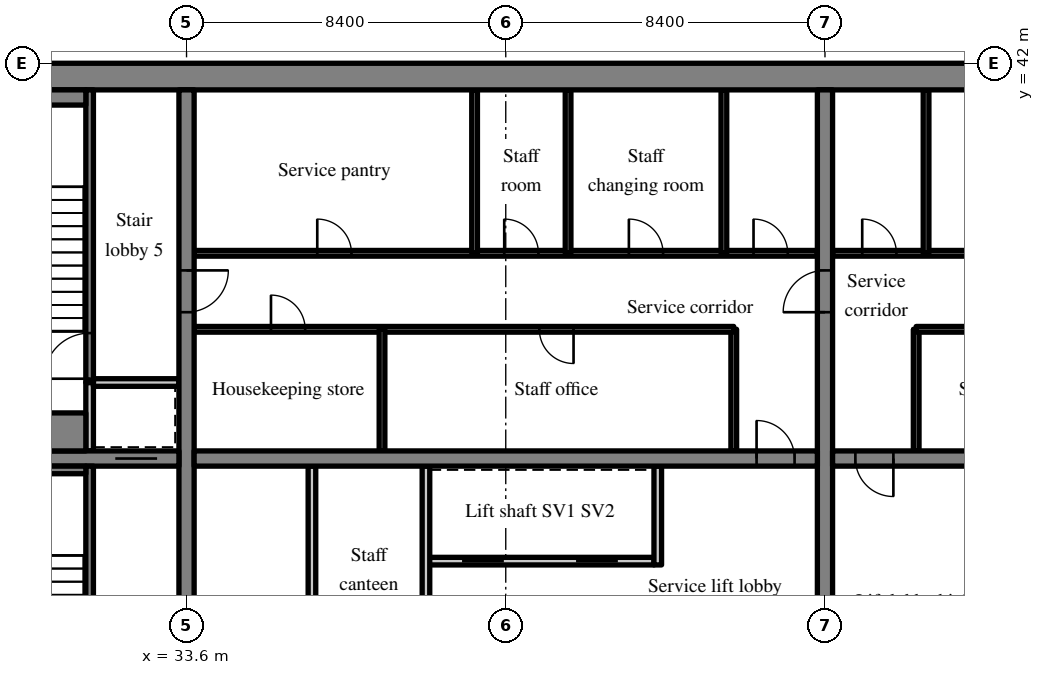
"""IFC4 building model, lengths in metres.
Left out: names, types, materials, properties, quantities, classifications, styles, units other than length and angle.
Written with IfcOpenShell. Run it as: python <this file> out.ifc"""

import sys

from ifc_helpers import new_model, si_unit, direction, frame, frame_2d, origin, place, context, subcontext, project, spatial, rectangle, extrude, source, transform, mapped, element, fill, save


model = new_model("IFC4")
c1 = context("Model", 3, precision=1e-05, world=origin(), true_north=direction((0.0, 1.0)))
c2 = subcontext(c1, "Body", "Model", "MODEL_VIEW")
j1 = project(units=[si_unit("LENGTHUNIT", "METRE"), si_unit("PLANEANGLEUNIT", "RADIAN")], contexts=[c1])
p1 = place(None, origin())
s1 = spatial("IfcSite", under=j1, at=p1, CompositionType="ELEMENT")
p2 = place(p1, origin())
s2 = spatial("IfcBuilding", under=s1, at=p2, CompositionType="ELEMENT")
p3 = place(p2, frame((0.0, 0.0, 163.0)))
s3 = spatial("IfcBuildingStorey", under=s2, at=p3, CompositionType="ELEMENT", Elevation=163.0)
m1 = source(origin(), c2, "Body", "SweptSolid", [
    extrude(rectangle(XDim=50.4, YDim=0.7, at=frame_2d((25.2, 0.0))), origin(), (0.0, 0.0, 1.0), 3.52),
])
p4 = place(p3, frame((25.2, 41.65, 0.0), z_axis=(0.0, 0.0, 1.0), x_axis=(1.0, 0.0, 0.0)))
e1 = element("IfcWall", 1, at=p4, inside=s3, PredefinedType="SHEAR", context=c2, shape_type="MappedRepresentation", body=[
    mapped(m1, transform((0.0, 0.0, 0.0), scale=1.0)),
])
m2 = source(origin(), c2, "Body", "SweptSolid", [
    extrude(rectangle(XDim=18.6, YDim=0.4, at=frame_2d((9.3, 0.0))), origin(), (0.0, 0.0, 1.0), 3.52),
])
p5 = place(p3, frame((33.6, 22.7, 0.0), z_axis=(0.0, 0.0, 1.0), x_axis=(0.0, 1.0, 0.0)))
e2 = element("IfcWall", 2, at=p5, inside=s3, PredefinedType="SHEAR", context=c2, shape_type="MappedRepresentation", body=[
    mapped(m2, transform((0.0, 0.0, 0.0), scale=1.0)),
])
m3 = source(origin(), c2, "Body", "SweptSolid", [
    extrude(rectangle(XDim=1.1, YDim=2.1, at=frame_2d((0.55, 1.05))), frame((0.0, 0.21, 0.0), z_axis=(0.0, -1.0, 0.0), x_axis=(1.0, 0.0, 0.0)), (0.0, 0.0, 1.0), 0.42),
])
p6 = place(p5, frame((12.75, 0.0, 0.0)))
e3 = element("IfcOpeningElement", 3, at=p6, cuts=e2, PredefinedType="OPENING", context=c2, shape_type="MappedRepresentation", body=[
    mapped(m3, transform((0.0, 0.0, 0.0), scale=1.0)),
])
p7 = place(p3, frame((50.4, 22.7, 0.0), z_axis=(0.0, 0.0, 1.0), x_axis=(0.0, 1.0, 0.0)))
e4 = element("IfcWall", 4, at=p7, inside=s3, PredefinedType="SHEAR", context=c2, shape_type="MappedRepresentation", body=[
    mapped(m2, transform((0.0, 0.0, 0.0), scale=1.0)),
])
p8 = place(p7, frame((12.75, 0.0, 0.0)))
e5 = element("IfcOpeningElement", 5, at=p8, cuts=e4, PredefinedType="OPENING", context=c2, shape_type="MappedRepresentation", body=[
    mapped(m3, transform((0.0, 0.0, 0.0), scale=1.0)),
])
m4 = source(origin(), c2, "Body", "SweptSolid", [
    extrude(rectangle(XDim=7.5, YDim=0.4, at=frame_2d((3.75, 0.0))), origin(), (0.0, 0.0, 1.0), 3.52),
])
p9 = place(p3, frame((25.9, 31.6, 0.0), z_axis=(0.0, 0.0, 1.0), x_axis=(1.0, 0.0, 0.0)))
e6 = element("IfcWall", 6, at=p9, inside=s3, PredefinedType="SHEAR", context=c2, shape_type="MappedRepresentation", body=[
    mapped(m4, transform((0.0, 0.0, 0.0), scale=1.0)),
])
p10 = place(p9, frame((5.825, 0.0, 0.0)))
e7 = element("IfcOpeningElement", 7, at=p10, cuts=e6, PredefinedType="OPENING", context=c2, shape_type="MappedRepresentation", body=[
    mapped(m3, transform((0.0, 0.0, 0.0), scale=1.0)),
])
m5 = source(origin(), c2, "Body", "SweptSolid", [
    extrude(rectangle(XDim=16.4, YDim=0.4, at=frame_2d((8.2, 0.0))), origin(), (0.0, 0.0, 1.0), 3.52),
])
p11 = place(p3, frame((33.8, 31.6, 0.0), z_axis=(0.0, 0.0, 1.0), x_axis=(1.0, 0.0, 0.0)))
e8 = element("IfcWall", 8, at=p11, inside=s3, PredefinedType="SHEAR", context=c2, shape_type="MappedRepresentation", body=[
    mapped(m5, transform((0.0, 0.0, 0.0), scale=1.0)),
])
m6 = source(origin(), c2, "Body", "SweptSolid", [
    extrude(rectangle(XDim=1.0, YDim=2.1, at=frame_2d((0.5, 1.05))), frame((0.0, 0.21, 0.0), z_axis=(0.0, -1.0, 0.0), x_axis=(1.0, 0.0, 0.0)), (0.0, 0.0, 1.0), 0.42),
])
p12 = place(p11, frame((14.8, 0.0, 0.0)))
e9 = element("IfcOpeningElement", 9, at=p12, cuts=e8, PredefinedType="OPENING", context=c2, shape_type="MappedRepresentation", body=[
    mapped(m6, transform((0.0, 0.0, 0.0), scale=1.0)),
])
p13 = place(p3, frame((50.6, 31.6, 0.0), z_axis=(0.0, 0.0, 1.0), x_axis=(1.0, 0.0, 0.0)))
e10 = element("IfcWall", 10, at=p13, inside=s3, PredefinedType="SHEAR", context=c2, shape_type="MappedRepresentation", body=[
    mapped(m5, transform((0.0, 0.0, 0.0), scale=1.0)),
])
p14 = place(p13, frame((0.6, 0.0, 0.0)))
e11 = element("IfcOpeningElement", 11, at=p14, cuts=e10, PredefinedType="OPENING", context=c2, shape_type="MappedRepresentation", body=[
    mapped(m6, transform((0.0, 0.0, 0.0), scale=1.0)),
])
m7 = source(origin(), c2, "Body", "SweptSolid", [
    extrude(rectangle(XDim=6.0, YDim=0.2, at=frame_2d((3.0, 0.0))), origin(), (0.0, 0.0, 1.0), 3.52),
])
p15 = place(p3, frame((39.9, 28.9, 0.0), z_axis=(0.0, 0.0, 1.0), x_axis=(1.0, 0.0, 0.0)))
e12 = element("IfcWall", 12, at=p15, inside=s3, PredefinedType="SOLIDWALL", context=c2, shape_type="MappedRepresentation", body=[
    mapped(m7, transform((0.0, 0.0, 0.0), scale=1.0)),
])
m8 = source(origin(), c2, "Body", "SweptSolid", [
    extrude(rectangle(XDim=1.1, YDim=2.1, at=frame_2d((0.55, 1.05))), frame((0.0, 0.11, 0.0), z_axis=(0.0, -1.0, 0.0), x_axis=(1.0, 0.0, 0.0)), (0.0, 0.0, 1.0), 0.22),
])
p16 = place(p15, frame((0.95, 0.0, 0.0)))
e13 = element("IfcOpeningElement", 13, at=p16, cuts=e12, PredefinedType="OPENING", context=c2, shape_type="MappedRepresentation", body=[
    mapped(m8, transform((0.0, 0.0, 0.0), scale=1.0)),
])
p17 = place(p15, frame((3.95, 0.0, 0.0)))
e14 = element("IfcOpeningElement", 14, at=p17, cuts=e12, PredefinedType="OPENING", context=c2, shape_type="MappedRepresentation", body=[
    mapped(m8, transform((0.0, 0.0, 0.0), scale=1.0)),
])
m9 = source(origin(), c2, "Body", "SweptSolid", [
    extrude(rectangle(XDim=8.7, YDim=0.2, at=frame_2d((4.35, 0.0))), origin(), (0.0, 0.0, 1.0), 3.52),
])
p18 = place(p3, frame((39.9, 22.7, 0.0), z_axis=(0.0, 0.0, 1.0), x_axis=(0.0, 1.0, 0.0)))
e15 = element("IfcWall", 15, at=p18, inside=s3, PredefinedType="PARTITIONING", context=c2, shape_type="MappedRepresentation", body=[
    mapped(m9, transform((0.0, 0.0, 0.0), scale=1.0)),
])
m10 = source(origin(), c2, "Body", "SweptSolid", [
    extrude(rectangle(XDim=0.9, YDim=2.1, at=frame_2d((0.45, 1.05))), frame((0.0, 0.11, 0.0), z_axis=(0.0, -1.0, 0.0), x_axis=(1.0, 0.0, 0.0)), (0.0, 0.0, 1.0), 0.22),
])
p19 = place(p18, frame((3.85, 0.0, 0.0)))
e16 = element("IfcOpeningElement", 16, at=p19, cuts=e15, PredefinedType="OPENING", context=c2, shape_type="MappedRepresentation", body=[
    mapped(m10, transform((0.0, 0.0, 0.0), scale=1.0)),
])
m11 = source(origin(), c2, "Body", "SweptSolid", [
    extrude(rectangle(XDim=2.6, YDim=0.2, at=frame_2d((1.3, 0.0))), origin(), (0.0, 0.0, 1.0), 3.52),
])
p20 = place(p3, frame((46.0, 28.8, 0.0), z_axis=(0.0, 0.0, 1.0), x_axis=(0.0, 1.0, 0.0)))
e17 = element("IfcWall", 17, at=p20, inside=s3, PredefinedType="SOLIDWALL", context=c2, shape_type="MappedRepresentation", body=[
    mapped(m11, transform((0.0, 0.0, 0.0), scale=1.0)),
])
p21 = place(p3, frame((36.9, 22.7, 0.0), z_axis=(0.0, 0.0, 1.0), x_axis=(0.0, 1.0, 0.0)))
e18 = element("IfcWall", 18, at=p21, inside=s3, PredefinedType="PARTITIONING", context=c2, shape_type="MappedRepresentation", body=[
    mapped(m9, transform((0.0, 0.0, 0.0), scale=1.0)),
])
m12 = source(origin(), c2, "Body", "SweptSolid", [
    extrude(rectangle(XDim=3.2, YDim=0.15, at=frame_2d((1.6, 0.0))), origin(), (0.0, 0.0, 1.0), 3.52),
])
p22 = place(p3, frame((48.0, 31.8, 0.0), z_axis=(0.0, 0.0, 1.0), x_axis=(0.0, 1.0, 0.0)))
e19 = element("IfcWall", 19, at=p22, inside=s3, PredefinedType="PARTITIONING", context=c2, shape_type="MappedRepresentation", body=[
    mapped(m12, transform((0.0, 0.0, 0.0), scale=1.0)),
])
m13 = source(origin(), c2, "Body", "SweptSolid", [
    extrude(rectangle(XDim=14.2, YDim=0.15, at=frame_2d((7.1, 0.0))), origin(), (0.0, 0.0, 1.0), 3.52),
])
p23 = place(p3, frame((33.8, 35.0, 0.0), z_axis=(0.0, 0.0, 1.0), x_axis=(1.0, 0.0, 0.0)))
e20 = element("IfcWall", 20, at=p23, inside=s3, PredefinedType="PARTITIONING", context=c2, shape_type="MappedRepresentation", body=[
    mapped(m13, transform((0.0, 0.0, 0.0), scale=1.0)),
])
m14 = source(origin(), c2, "Body", "SweptSolid", [
    extrude(rectangle(XDim=0.9, YDim=2.1, at=frame_2d((0.45, 1.05))), frame((0.0, 0.085, 0.0), z_axis=(0.0, -1.0, 0.0), x_axis=(1.0, 0.0, 0.0)), (0.0, 0.0, 1.0), 0.17),
])
p24 = place(p23, frame((2.022, 0.0, 0.0)))
e21 = element("IfcOpeningElement", 21, at=p24, cuts=e20, PredefinedType="OPENING", context=c2, shape_type="MappedRepresentation", body=[
    mapped(m14, transform((0.0, 0.0, 0.0), scale=1.0)),
])
p25 = place(p23, frame((9.084, 0.0, 0.0)))
e22 = element("IfcOpeningElement", 22, at=p25, cuts=e20, PredefinedType="OPENING", context=c2, shape_type="MappedRepresentation", body=[
    mapped(m14, transform((0.0, 0.0, 0.0), scale=1.0)),
])
m15 = source(origin(), c2, "Body", "SweptSolid", [
    extrude(rectangle(XDim=16.4, YDim=0.15, at=frame_2d((8.2, 0.0))), origin(), (0.0, 0.0, 1.0), 3.52),
])
p26 = place(p3, frame((33.8, 37.0, 0.0), z_axis=(0.0, 0.0, 1.0), x_axis=(1.0, 0.0, 0.0)))
e23 = element("IfcWall", 23, at=p26, inside=s3, PredefinedType="PARTITIONING", context=c2, shape_type="MappedRepresentation", body=[
    mapped(m15, transform((0.0, 0.0, 0.0), scale=1.0)),
])
p27 = place(p26, frame((3.24, 0.0, 0.0)))
e24 = element("IfcOpeningElement", 24, at=p27, cuts=e23, PredefinedType="OPENING", context=c2, shape_type="MappedRepresentation", body=[
    mapped(m14, transform((0.0, 0.0, 0.0), scale=1.0)),
])
p28 = place(p26, frame((8.16, 0.0, 0.0)))
e25 = element("IfcOpeningElement", 25, at=p28, cuts=e23, PredefinedType="OPENING", context=c2, shape_type="MappedRepresentation", body=[
    mapped(m14, transform((0.0, 0.0, 0.0), scale=1.0)),
])
p29 = place(p26, frame((11.44, 0.0, 0.0)))
e26 = element("IfcOpeningElement", 26, at=p29, cuts=e23, PredefinedType="OPENING", context=c2, shape_type="MappedRepresentation", body=[
    mapped(m14, transform((0.0, 0.0, 0.0), scale=1.0)),
])
p30 = place(p26, frame((14.72, 0.0, 0.0)))
e27 = element("IfcOpeningElement", 27, at=p30, cuts=e23, PredefinedType="OPENING", context=c2, shape_type="MappedRepresentation", body=[
    mapped(m14, transform((0.0, 0.0, 0.0), scale=1.0)),
])
p31 = place(p3, frame((38.744, 31.8, 0.0), z_axis=(0.0, 0.0, 1.0), x_axis=(0.0, 1.0, 0.0)))
e28 = element("IfcWall", 28, at=p31, inside=s3, PredefinedType="PARTITIONING", context=c2, shape_type="MappedRepresentation", body=[
    mapped(m12, transform((0.0, 0.0, 0.0), scale=1.0)),
])
m16 = source(origin(), c2, "Body", "SweptSolid", [
    extrude(rectangle(XDim=4.3, YDim=0.15, at=frame_2d((2.15, 0.0))), origin(), (0.0, 0.0, 1.0), 3.52),
])
for number, where, z_axis, x_axis in (
    (29, (41.18, 37.0, 0.0), (0.0, 0.0, 1.0), (0.0, 1.0, 0.0)),
    (30, (43.64, 37.0, 0.0), (0.0, 0.0, 1.0), (0.0, 1.0, 0.0)),
    (31, (47.74, 37.0, 0.0), (0.0, 0.0, 1.0), (0.0, 1.0, 0.0)),
):
    element("IfcWall", number, at=place(p3, frame(where, z_axis=z_axis, x_axis=x_axis)), inside=s3, PredefinedType="PARTITIONING", context=c2, shape_type="MappedRepresentation", body=[
        mapped(m16, transform((0.0, 0.0, 0.0), scale=1.0)),
    ])
p32 = place(p3, frame((52.8, 31.8, 0.0), z_axis=(0.0, 0.0, 1.0), x_axis=(0.0, 1.0, 0.0)))
e32 = element("IfcWall", 32, at=p32, inside=s3, PredefinedType="PARTITIONING", context=c2, shape_type="MappedRepresentation", body=[
    mapped(m12, transform((0.0, 0.0, 0.0), scale=1.0)),
])
p33 = place(p3, frame((67.0, 35.0, 0.0), z_axis=(0.0, 0.0, 1.0), x_axis=(-1.0, 0.0, 0.0)))
e33 = element("IfcWall", 33, at=p33, inside=s3, PredefinedType="PARTITIONING", context=c2, shape_type="MappedRepresentation", body=[
    mapped(m13, transform((0.0, 0.0, 0.0), scale=1.0)),
])
p34 = place(p33, frame((0.962, 0.0, 0.0)))
e34 = element("IfcOpeningElement", 34, at=p34, cuts=e33, PredefinedType="OPENING", context=c2, shape_type="MappedRepresentation", body=[
    mapped(m14, transform((0.0, 0.0, 0.0), scale=1.0)),
])
p35 = place(p33, frame((5.906, 0.0, 0.0)))
e35 = element("IfcOpeningElement", 35, at=p35, cuts=e33, PredefinedType="OPENING", context=c2, shape_type="MappedRepresentation", body=[
    mapped(m14, transform((0.0, 0.0, 0.0), scale=1.0)),
])
p36 = place(p33, frame((11.556, 0.0, 0.0)))
e36 = element("IfcOpeningElement", 36, at=p36, cuts=e33, PredefinedType="OPENING", context=c2, shape_type="MappedRepresentation", body=[
    mapped(m14, transform((0.0, 0.0, 0.0), scale=1.0)),
])
p37 = place(p3, frame((67.0, 37.0, 0.0), z_axis=(0.0, 0.0, 1.0), x_axis=(-1.0, 0.0, 0.0)))
e37 = element("IfcWall", 37, at=p37, inside=s3, PredefinedType="PARTITIONING", context=c2, shape_type="MappedRepresentation", body=[
    mapped(m15, transform((0.0, 0.0, 0.0), scale=1.0)),
])
p38 = place(p37, frame((0.78, 0.0, 0.0)))
e38 = element("IfcOpeningElement", 38, at=p38, cuts=e37, PredefinedType="OPENING", context=c2, shape_type="MappedRepresentation", body=[
    mapped(m14, transform((0.0, 0.0, 0.0), scale=1.0)),
])
p39 = place(p37, frame((3.65, 0.0, 0.0)))
e39 = element("IfcOpeningElement", 39, at=p39, cuts=e37, PredefinedType="OPENING", context=c2, shape_type="MappedRepresentation", body=[
    mapped(m14, transform((0.0, 0.0, 0.0), scale=1.0)),
])
p40 = place(p37, frame((9.39, 0.0, 0.0)))
e40 = element("IfcOpeningElement", 40, at=p40, cuts=e37, PredefinedType="OPENING", context=c2, shape_type="MappedRepresentation", body=[
    mapped(m14, transform((0.0, 0.0, 0.0), scale=1.0)),
])
p41 = place(p37, frame((14.72, 0.0, 0.0)))
e41 = element("IfcOpeningElement", 41, at=p41, cuts=e37, PredefinedType="OPENING", context=c2, shape_type="MappedRepresentation", body=[
    mapped(m14, transform((0.0, 0.0, 0.0), scale=1.0)),
])
p42 = place(p3, frame((53.06, 37.0, 0.0), z_axis=(0.0, 0.0, 1.0), x_axis=(0.0, 1.0, 0.0)))
e42 = element("IfcWall", 42, at=p42, inside=s3, PredefinedType="PARTITIONING", context=c2, shape_type="MappedRepresentation", body=[
    mapped(m16, transform((0.0, 0.0, 0.0), scale=1.0)),
])
m17 = source(origin(), c2, "Body", "SweptSolid", [
    extrude(rectangle(XDim=8.7, YDim=0.2, at=frame_2d((4.35, 0.0))), origin(), (0.0, 0.0, 1.0), 3.52),
])
p43 = place(p3, frame((31.05, 22.7, 0.0), z_axis=(0.0, 0.0, 1.0), x_axis=(0.0, 1.0, 0.0)))
e43 = element("IfcWall", 43, at=p43, inside=s3, PredefinedType="SOLIDWALL", context=c2, shape_type="MappedRepresentation", body=[
    mapped(m17, transform((0.0, 0.0, 0.0), scale=1.0)),
])
m18 = source(origin(), c2, "Body", "SweptSolid", [
    extrude(rectangle(XDim=1.2, YDim=2.1, at=frame_2d((0.6, 1.05))), frame((0.0, 0.11, 0.0), z_axis=(0.0, -1.0, 0.0), x_axis=(1.0, 0.0, 0.0)), (0.0, 0.0, 1.0), 0.22),
])
p44 = place(p43, frame((0.9, 0.0, 0.0)))
e44 = element("IfcOpeningElement", 44, at=p44, cuts=e43, PredefinedType="OPENING", context=c2, shape_type="MappedRepresentation", body=[
    mapped(m18, transform((0.0, 0.0, 0.0), scale=1.0)),
])
m19 = source(origin(), c2, "Body", "SweptSolid", [
    extrude(rectangle(XDim=1.8, YDim=0.2, at=frame_2d((0.9, 0.0))), origin(), (0.0, 0.0, 1.0), 3.52),
])
p45 = place(p3, frame((31.05, 31.8, 0.0), z_axis=(0.0, 0.0, 1.0), x_axis=(0.0, 1.0, 0.0)))
e45 = element("IfcWall", 45, at=p45, inside=s3, PredefinedType="SOLIDWALL", context=c2, shape_type="MappedRepresentation", body=[
    mapped(m19, transform((0.0, 0.0, 0.0), scale=1.0)),
])
m20 = source(origin(), c2, "Body", "SweptSolid", [
    extrude(rectangle(XDim=2.25, YDim=0.2, at=frame_2d((1.125, 0.0))), origin(), (0.0, 0.0, 1.0), 3.52),
])
p46 = place(p3, frame((31.15, 33.6, 0.0), z_axis=(0.0, 0.0, 1.0), x_axis=(1.0, 0.0, 0.0)))
e46 = element("IfcWall", 46, at=p46, inside=s3, PredefinedType="SOLIDWALL", context=c2, shape_type="MappedRepresentation", body=[
    mapped(m20, transform((0.0, 0.0, 0.0), scale=1.0)),
])
m21 = source(origin(), c2, "Body", "SweptSolid", [
    extrude(rectangle(XDim=7.7, YDim=0.2, at=frame_2d((3.85, 0.0))), origin(), (0.0, 0.0, 1.0), 3.52),
])
p47 = place(p3, frame((31.05, 33.6, 0.0), z_axis=(0.0, 0.0, 1.0), x_axis=(0.0, 1.0, 0.0)))
e47 = element("IfcWall", 47, at=p47, inside=s3, PredefinedType="SOLIDWALL", context=c2, shape_type="MappedRepresentation", body=[
    mapped(m21, transform((0.0, 0.0, 0.0), scale=1.0)),
])
p48 = place(p47, frame((0.1, 0.0, 0.0)))
e48 = element("IfcOpeningElement", 48, at=p48, cuts=e47, PredefinedType="OPENING", context=c2, shape_type="MappedRepresentation", body=[
    mapped(m18, transform((0.0, 0.0, 0.0), scale=1.0)),
])
m22 = source(origin(), c2, "Body", "SweptSolid", [
    extrude(rectangle(XDim=5.05, YDim=0.2, at=frame_2d((2.525, 0.0))), origin(), (0.0, 0.0, 1.0), 3.52),
])
p49 = place(p3, frame((25.9, 31.3, 0.0), z_axis=(0.0, 0.0, 1.0), x_axis=(1.0, 0.0, 0.0)))
e49 = element("IfcWall", 49, at=p49, inside=s3, PredefinedType="SOLIDWALL", context=c2, shape_type="MappedRepresentation", body=[
    mapped(m22, transform((0.0, 0.0, 0.0), scale=1.0)),
])
m23 = source(origin(), c2, "Body", "SweptSolid", [
    extrude(rectangle(XDim=5.05, YDim=0.4, at=frame_2d((2.525, 0.0))), origin(), (0.0, 0.0, 1.0), 3.52),
])
p50 = place(p3, frame((25.9, 41.1, 0.0), z_axis=(0.0, 0.0, 1.0), x_axis=(1.0, 0.0, 0.0)))
e50 = element("IfcWall", 50, at=p50, inside=s3, PredefinedType="SOLIDWALL", context=c2, shape_type="MappedRepresentation", body=[
    mapped(m23, transform((0.0, 0.0, 0.0), scale=1.0)),
])
m24 = source(origin(), c2, "Body", "SweptSolid", [
    extrude(rectangle(XDim=5.05, YDim=1.0, at=frame_2d((2.525, 0.0))), origin(), (0.0, 0.0, 1.0), 3.52),
])
p51 = place(p3, frame((25.9, 32.3, 0.0), z_axis=(0.0, 0.0, 1.0), x_axis=(1.0, 0.0, 0.0)))
e51 = element("IfcWall", 51, at=p51, inside=s3, PredefinedType="SOLIDWALL", context=c2, shape_type="MappedRepresentation", body=[
    mapped(m24, transform((0.0, 0.0, 0.0), scale=1.0)),
])
m25 = source(origin(), c2, "Body", "SweptSolid", [
    extrude(rectangle(XDim=1.0, YDim=2.1, at=frame_2d((0.5, 1.05))), frame((0.0, 0.025, 0.0), z_axis=(0.0, -1.0, 0.0), x_axis=(1.0, 0.0, 0.0)), (0.0, 0.0, 1.0), 0.05),
])
p52 = place(p12, origin())
e52 = element("IfcDoor", 52, at=p52, inside=s3, OperationType="SINGLE_SWING_LEFT", PredefinedType="DOOR", context=c2, shape_type="MappedRepresentation", body=[
    mapped(m25, transform((0.0, 0.0, 0.0), scale=1.0)),
])
fill(e9, e52)
m26 = source(origin(), c2, "Body", "SweptSolid", [
    extrude(rectangle(XDim=1.1, YDim=2.1, at=frame_2d((0.55, 1.05))), frame((0.0, 0.025, 0.0), z_axis=(0.0, -1.0, 0.0), x_axis=(1.0, 0.0, 0.0)), (0.0, 0.0, 1.0), 0.05),
])
p53 = place(p16, origin())
e53 = element("IfcDoor", 53, at=p53, inside=s3, OperationType="SLIDING_TO_LEFT", PredefinedType="DOOR", context=c2, shape_type="MappedRepresentation", body=[
    mapped(m26, transform((0.0, 0.0, 0.0), scale=1.0)),
])
fill(e13, e53)
p54 = place(p17, origin())
e54 = element("IfcDoor", 54, at=p54, inside=s3, OperationType="SLIDING_TO_RIGHT", PredefinedType="DOOR", context=c2, shape_type="MappedRepresentation", body=[
    mapped(m26, transform((0.0, 0.0, 0.0), scale=1.0)),
])
fill(e14, e54)
m27 = source(origin(), c2, "Body", "SweptSolid", [
    extrude(rectangle(XDim=0.9, YDim=2.1, at=frame_2d((0.45, 1.05))), frame((0.0, 0.025, 0.0), z_axis=(0.0, -1.0, 0.0), x_axis=(1.0, 0.0, 0.0)), (0.0, 0.0, 1.0), 0.05),
])
p55 = place(p24, origin())
e55 = element("IfcDoor", 55, at=p55, inside=s3, OperationType="SINGLE_SWING_LEFT", PredefinedType="DOOR", context=c2, shape_type="MappedRepresentation", body=[
    mapped(m27, transform((0.0, 0.0, 0.0), scale=1.0)),
])
fill(e21, e55)
p56 = place(p25, origin())
e56 = element("IfcDoor", 56, at=p56, inside=s3, OperationType="SINGLE_SWING_RIGHT", PredefinedType="DOOR", context=c2, shape_type="MappedRepresentation", body=[
    mapped(m27, transform((0.0, 0.0, 0.0), scale=1.0)),
])
fill(e22, e56)
p57 = place(p27, origin())
e57 = element("IfcDoor", 57, at=p57, inside=s3, OperationType="SINGLE_SWING_LEFT", PredefinedType="DOOR", context=c2, shape_type="MappedRepresentation", body=[
    mapped(m27, transform((0.0, 0.0, 0.0), scale=1.0)),
])
fill(e24, e57)
p58 = place(p28, origin())
e58 = element("IfcDoor", 58, at=p58, inside=s3, OperationType="SINGLE_SWING_LEFT", PredefinedType="DOOR", context=c2, shape_type="MappedRepresentation", body=[
    mapped(m27, transform((0.0, 0.0, 0.0), scale=1.0)),
])
fill(e25, e58)
p59 = place(p29, origin())
e59 = element("IfcDoor", 59, at=p59, inside=s3, OperationType="SINGLE_SWING_LEFT", PredefinedType="DOOR", context=c2, shape_type="MappedRepresentation", body=[
    mapped(m27, transform((0.0, 0.0, 0.0), scale=1.0)),
])
fill(e26, e59)
p60 = place(p30, origin())
e60 = element("IfcDoor", 60, at=p60, inside=s3, OperationType="SINGLE_SWING_LEFT", PredefinedType="DOOR", context=c2, shape_type="MappedRepresentation", body=[
    mapped(m27, transform((0.0, 0.0, 0.0), scale=1.0)),
])
fill(e27, e60)
p61 = place(p14, origin())
e61 = element("IfcDoor", 61, at=p61, inside=s3, OperationType="SINGLE_SWING_RIGHT", PredefinedType="DOOR", context=c2, shape_type="MappedRepresentation", body=[
    mapped(m25, transform((0.0, 0.0, 0.0), scale=1.0)),
])
fill(e11, e61)
p62 = place(p41, origin())
e62 = element("IfcDoor", 62, at=p62, inside=s3, OperationType="SINGLE_SWING_RIGHT", PredefinedType="DOOR", context=c2, shape_type="MappedRepresentation", body=[
    mapped(m27, transform((0.0, 0.0, 0.0), scale=1.0)),
])
fill(e41, e62)
p63 = place(p10, origin())
e63 = element("IfcDoor", 63, at=p63, inside=s3, OperationType="SLIDING_TO_LEFT", PredefinedType="DOOR", context=c2, shape_type="MappedRepresentation", body=[
    mapped(m26, transform((0.0, 0.0, 0.0), scale=1.0)),
])
fill(e7, e63)
m28 = source(origin(), c2, "Body", "SweptSolid", [
    extrude(rectangle(XDim=1.2, YDim=2.1, at=frame_2d((0.6, 1.05))), frame((0.0, 0.025, 0.0), z_axis=(0.0, -1.0, 0.0), x_axis=(1.0, 0.0, 0.0)), (0.0, 0.0, 1.0), 0.05),
])
p64 = place(p48, origin())
e64 = element("IfcDoor", 64, at=p64, inside=s3, OperationType="SINGLE_SWING_LEFT", PredefinedType="DOOR", context=c2, shape_type="MappedRepresentation", body=[
    mapped(m28, transform((0.0, 0.0, 0.0), scale=1.0)),
])
fill(e48, e64)
p65 = place(p6, origin())
e65 = element("IfcDoor", 65, at=p65, inside=s3, OperationType="SINGLE_SWING_RIGHT", PredefinedType="DOOR", context=c2, shape_type="MappedRepresentation", body=[
    mapped(m26, transform((0.0, 0.0, 0.0), scale=1.0)),
])
fill(e3, e65)
p66 = place(p8, origin())
e66 = element("IfcDoor", 66, at=p66, inside=s3, OperationType="SINGLE_SWING_LEFT", PredefinedType="DOOR", context=c2, shape_type="MappedRepresentation", body=[
    mapped(m26, transform((0.0, 0.0, 0.0), scale=1.0)),
])
fill(e5, e66)
save(model, sys.argv[1])
